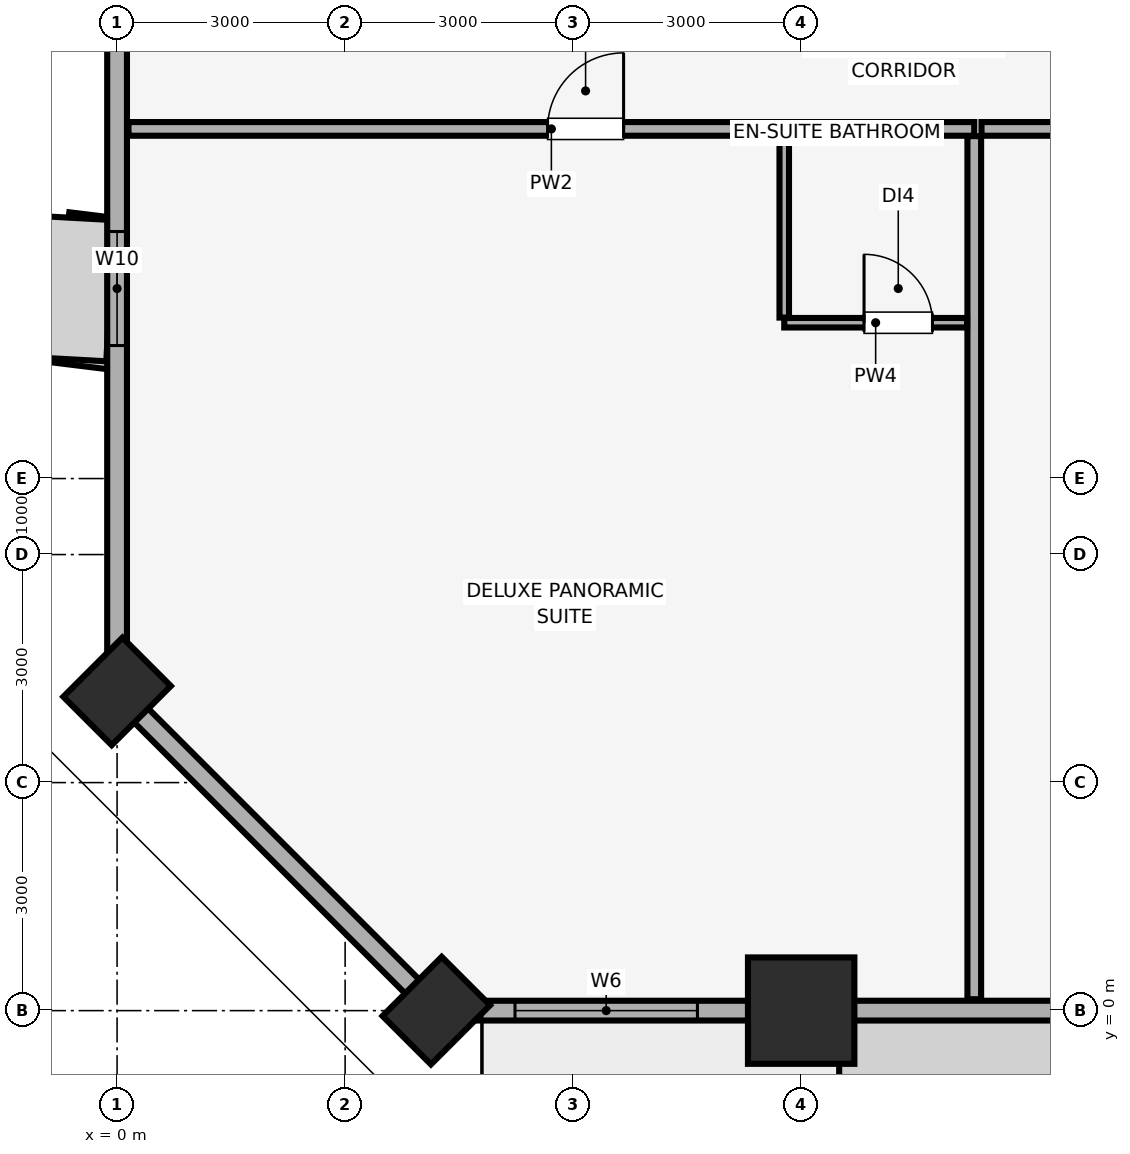
"""IFC4 building model, lengths in metres.
Left out: names, types, materials, properties, quantities, classifications, styles, units other than length and angle.
Written with IfcOpenShell. Run it as: python <this file> out.ifc"""

import sys

from ifc_helpers import new_model, si_unit, direction, frame, frame_2d, origin, origin_2d, place, context, subcontext, project, spatial, rectangle, extrude, element, fill, save


model = new_model("IFC4")
c1 = context("Model", 3, precision=1e-05, world=origin(), true_north=direction((0.0, 1.0)))
c2 = subcontext(c1, "Body", "Model", "MODEL_VIEW")
j1 = project(units=[si_unit("LENGTHUNIT", "METRE"), si_unit("PLANEANGLEUNIT", "RADIAN")], contexts=[c1])
p1 = place(None, origin())
s1 = spatial("IfcSite", under=j1, at=p1, CompositionType="ELEMENT")
p2 = place(p1, origin())
s2 = spatial("IfcBuilding", under=s1, at=p2, CompositionType="ELEMENT")
p3 = place(p2, frame((0.0, 0.0, 57.65)))
s3 = spatial("IfcBuildingStorey", under=s2, at=p3, CompositionType="ELEMENT", Elevation=57.65)
p4 = place(p3, frame((9.0, 0.0, 0.0), z_axis=(0.0, 0.0, 1.0), x_axis=(1.0, 0.0, 0.0)))
e1 = element("IfcColumn", 1, at=p4, inside=s3, PredefinedType="COLUMN", context=c2, shape_type="SweptSolid", body=[
    extrude(rectangle(XDim=1.4, YDim=1.4, at=origin_2d()), origin(), (0.0, 0.0, 1.0), 3.51),
])
for number, where, z_axis, x_axis in (
    (2, (4.2, 0.0, 0.0), (0.0, 0.0, 1.0), (0.707, 0.707, 0.0)),
    (3, (0.0, 4.2, 0.0), (0.0, 0.0, 1.0), (0.707, 0.707, 0.0)),
):
    element("IfcColumn", number, at=place(p3, frame(where, z_axis=z_axis, x_axis=x_axis)), inside=s3, PredefinedType="PILASTER", context=c2, shape_type="SweptSolid", body=[
        extrude(rectangle(XDim=1.1, YDim=0.9, at=origin_2d()), origin(), (0.0, 0.0, 1.0), 3.51),
    ])
p5 = place(p3, frame((4.2, 0.0, 0.0), z_axis=(0.0, 0.0, 1.0), x_axis=(1.0, 0.0, 0.0)))
e4 = element("IfcWall", 4, at=p5, inside=s3, PredefinedType="SOLIDWALL", context=c2, shape_type="SweptSolid", body=[
    extrude(rectangle(XDim=75.6, YDim=0.26, at=frame_2d((37.8, 0.0))), origin(), (0.0, 0.0, 1.0), 2.56),
])
p6 = place(p5, frame((21.383, 0.0, 0.0)))
e5 = element("IfcOpeningElement", 5, at=p6, cuts=e4, PredefinedType="OPENING", context=c2, shape_type="SweptSolid", body=[
    extrude(rectangle(XDim=1.1, YDim=2.15, at=frame_2d((0.55, 1.075))), frame((0.0, 0.14, 0.0), z_axis=(0.0, -1.0, 0.0), x_axis=(1.0, 0.0, 0.0)), (0.0, 0.0, 1.0), 0.28),
])
p7 = place(p5, frame((37.25, 0.0, 0.0)))
e6 = element("IfcOpeningElement", 6, at=p7, cuts=e4, PredefinedType="OPENING", context=c2, shape_type="SweptSolid", body=[
    extrude(rectangle(XDim=1.1, YDim=2.15, at=frame_2d((0.55, 1.075))), frame((0.0, 0.14, 0.0), z_axis=(0.0, -1.0, 0.0), x_axis=(1.0, 0.0, 0.0)), (0.0, 0.0, 1.0), 0.28),
])
p8 = place(p5, frame((53.117, 0.0, 0.0)))
e7 = element("IfcOpeningElement", 7, at=p8, cuts=e4, PredefinedType="OPENING", context=c2, shape_type="SweptSolid", body=[
    extrude(rectangle(XDim=1.1, YDim=2.15, at=frame_2d((0.55, 1.075))), frame((0.0, 0.14, 0.0), z_axis=(0.0, -1.0, 0.0), x_axis=(1.0, 0.0, 0.0)), (0.0, 0.0, 1.0), 0.28),
])
p9 = place(p5, frame((1.035, 0.0, 0.85)))
e8 = element("IfcOpeningElement", 8, at=p9, cuts=e4, PredefinedType="OPENING", context=c2, shape_type="SweptSolid", body=[
    extrude(rectangle(XDim=2.4, YDim=1.5, at=frame_2d((1.2, 0.75))), frame((0.0, 0.14, 0.0), z_axis=(0.0, -1.0, 0.0), x_axis=(1.0, 0.0, 0.0)), (0.0, 0.0, 1.0), 0.28),
])
p10 = place(p5, frame((8.138, 0.0, 0.85)))
e9 = element("IfcOpeningElement", 9, at=p10, cuts=e4, PredefinedType="OPENING", context=c2, shape_type="SweptSolid", body=[
    extrude(rectangle(XDim=2.4, YDim=1.5, at=frame_2d((1.2, 0.75))), frame((0.0, 0.14, 0.0), z_axis=(0.0, -1.0, 0.0), x_axis=(1.0, 0.0, 0.0)), (0.0, 0.0, 1.0), 0.28),
])
p11 = place(p5, frame((15.153, 0.0, 0.85)))
e10 = element("IfcOpeningElement", 10, at=p11, cuts=e4, PredefinedType="OPENING", context=c2, shape_type="SweptSolid", body=[
    extrude(rectangle(XDim=2.4, YDim=1.5, at=frame_2d((1.2, 0.75))), frame((0.0, 0.14, 0.0), z_axis=(0.0, -1.0, 0.0), x_axis=(1.0, 0.0, 0.0)), (0.0, 0.0, 1.0), 0.28),
])
p12 = place(p5, frame((23.127, 0.0, 0.85)))
e11 = element("IfcOpeningElement", 11, at=p12, cuts=e4, PredefinedType="OPENING", context=c2, shape_type="SweptSolid", body=[
    extrude(rectangle(XDim=2.4, YDim=1.5, at=frame_2d((1.2, 0.75))), frame((0.0, 0.14, 0.0), z_axis=(0.0, -1.0, 0.0), x_axis=(1.0, 0.0, 0.0)), (0.0, 0.0, 1.0), 0.28),
])
p13 = place(p5, frame((29.179, 0.0, 0.85)))
e12 = element("IfcOpeningElement", 12, at=p13, cuts=e4, PredefinedType="OPENING", context=c2, shape_type="SweptSolid", body=[
    extrude(rectangle(XDim=2.4, YDim=1.5, at=frame_2d((1.2, 0.75))), frame((0.0, 0.14, 0.0), z_axis=(0.0, -1.0, 0.0), x_axis=(1.0, 0.0, 0.0)), (0.0, 0.0, 1.0), 0.28),
])
p14 = place(p5, frame((34.983, 0.0, 0.85)))
e13 = element("IfcOpeningElement", 13, at=p14, cuts=e4, PredefinedType="OPENING", context=c2, shape_type="SweptSolid", body=[
    extrude(rectangle(XDim=1.5, YDim=1.4, at=frame_2d((0.75, 0.7))), frame((0.0, 0.14, 0.0), z_axis=(0.0, -1.0, 0.0), x_axis=(1.0, 0.0, 0.0)), (0.0, 0.0, 1.0), 0.28),
])
p15 = place(p5, frame((39.117, 0.0, 0.85)))
e14 = element("IfcOpeningElement", 14, at=p15, cuts=e4, PredefinedType="OPENING", context=c2, shape_type="SweptSolid", body=[
    extrude(rectangle(XDim=1.5, YDim=1.4, at=frame_2d((0.75, 0.7))), frame((0.0, 0.14, 0.0), z_axis=(0.0, -1.0, 0.0), x_axis=(1.0, 0.0, 0.0)), (0.0, 0.0, 1.0), 0.28),
])
p16 = place(p5, frame((44.021, 0.0, 0.85)))
e15 = element("IfcOpeningElement", 15, at=p16, cuts=e4, PredefinedType="OPENING", context=c2, shape_type="SweptSolid", body=[
    extrude(rectangle(XDim=2.4, YDim=1.5, at=frame_2d((1.2, 0.75))), frame((0.0, 0.14, 0.0), z_axis=(0.0, -1.0, 0.0), x_axis=(1.0, 0.0, 0.0)), (0.0, 0.0, 1.0), 0.28),
])
p17 = place(p5, frame((50.073, 0.0, 0.85)))
e16 = element("IfcOpeningElement", 16, at=p17, cuts=e4, PredefinedType="OPENING", context=c2, shape_type="SweptSolid", body=[
    extrude(rectangle(XDim=2.4, YDim=1.5, at=frame_2d((1.2, 0.75))), frame((0.0, 0.14, 0.0), z_axis=(0.0, -1.0, 0.0), x_axis=(1.0, 0.0, 0.0)), (0.0, 0.0, 1.0), 0.28),
])
p18 = place(p5, frame((58.048, 0.0, 0.85)))
e17 = element("IfcOpeningElement", 17, at=p18, cuts=e4, PredefinedType="OPENING", context=c2, shape_type="SweptSolid", body=[
    extrude(rectangle(XDim=2.4, YDim=1.5, at=frame_2d((1.2, 0.75))), frame((0.0, 0.14, 0.0), z_axis=(0.0, -1.0, 0.0), x_axis=(1.0, 0.0, 0.0)), (0.0, 0.0, 1.0), 0.28),
])
p19 = place(p5, frame((65.062, 0.0, 0.85)))
e18 = element("IfcOpeningElement", 18, at=p19, cuts=e4, PredefinedType="OPENING", context=c2, shape_type="SweptSolid", body=[
    extrude(rectangle(XDim=2.4, YDim=1.5, at=frame_2d((1.2, 0.75))), frame((0.0, 0.14, 0.0), z_axis=(0.0, -1.0, 0.0), x_axis=(1.0, 0.0, 0.0)), (0.0, 0.0, 1.0), 0.28),
])
p20 = place(p5, frame((72.165, 0.0, 0.85)))
e19 = element("IfcOpeningElement", 19, at=p20, cuts=e4, PredefinedType="OPENING", context=c2, shape_type="SweptSolid", body=[
    extrude(rectangle(XDim=2.4, YDim=1.5, at=frame_2d((1.2, 0.75))), frame((0.0, 0.14, 0.0), z_axis=(0.0, -1.0, 0.0), x_axis=(1.0, 0.0, 0.0)), (0.0, 0.0, 1.0), 0.28),
])
p21 = place(p3, frame((0.0, 44.8, 0.0), z_axis=(0.0, 0.0, 1.0), x_axis=(0.0, -1.0, 0.0)))
e20 = element("IfcWall", 20, at=p21, inside=s3, PredefinedType="SOLIDWALL", context=c2, shape_type="SweptSolid", body=[
    extrude(rectangle(XDim=40.6, YDim=0.26, at=frame_2d((20.3, 0.0))), origin(), (0.0, 0.0, 1.0), 2.56),
])
p22 = place(p21, frame((34.55, 0.0, 0.85)))
e21 = element("IfcOpeningElement", 21, at=p22, cuts=e20, PredefinedType="OPENING", context=c2, shape_type="SweptSolid", body=[
    extrude(rectangle(XDim=1.5, YDim=1.4, at=frame_2d((0.75, 0.7))), frame((0.0, 0.14, 0.0), z_axis=(0.0, -1.0, 0.0), x_axis=(1.0, 0.0, 0.0)), (0.0, 0.0, 1.0), 0.28),
])
p23 = place(p21, frame((25.64, 0.0, 0.85)))
e22 = element("IfcOpeningElement", 22, at=p23, cuts=e20, PredefinedType="OPENING", context=c2, shape_type="SweptSolid", body=[
    extrude(rectangle(XDim=1.5, YDim=1.4, at=frame_2d((0.75, 0.7))), frame((0.0, 0.14, 0.0), z_axis=(0.0, -1.0, 0.0), x_axis=(1.0, 0.0, 0.0)), (0.0, 0.0, 1.0), 0.28),
])
p24 = place(p21, frame((18.84, 0.0, 0.85)))
e23 = element("IfcOpeningElement", 23, at=p24, cuts=e20, PredefinedType="OPENING", context=c2, shape_type="SweptSolid", body=[
    extrude(rectangle(XDim=1.5, YDim=1.4, at=frame_2d((0.75, 0.7))), frame((0.0, 0.14, 0.0), z_axis=(0.0, -1.0, 0.0), x_axis=(1.0, 0.0, 0.0)), (0.0, 0.0, 1.0), 0.28),
])
p25 = place(p21, frame((11.935, 0.0, 0.85)))
e24 = element("IfcOpeningElement", 24, at=p25, cuts=e20, PredefinedType="OPENING", context=c2, shape_type="SweptSolid", body=[
    extrude(rectangle(XDim=1.5, YDim=1.4, at=frame_2d((0.75, 0.7))), frame((0.0, 0.14, 0.0), z_axis=(0.0, -1.0, 0.0), x_axis=(1.0, 0.0, 0.0)), (0.0, 0.0, 1.0), 0.28),
])
p26 = place(p21, frame((7.165, 0.0, 0.85)))
e25 = element("IfcOpeningElement", 25, at=p26, cuts=e20, PredefinedType="OPENING", context=c2, shape_type="SweptSolid", body=[
    extrude(rectangle(XDim=1.5, YDim=1.4, at=frame_2d((0.75, 0.7))), frame((0.0, 0.14, 0.0), z_axis=(0.0, -1.0, 0.0), x_axis=(1.0, 0.0, 0.0)), (0.0, 0.0, 1.0), 0.28),
])
p27 = place(p21, frame((1.735, 0.0, 0.85)))
e26 = element("IfcOpeningElement", 26, at=p27, cuts=e20, PredefinedType="OPENING", context=c2, shape_type="SweptSolid", body=[
    extrude(rectangle(XDim=1.5, YDim=1.4, at=frame_2d((0.75, 0.7))), frame((0.0, 0.14, 0.0), z_axis=(0.0, -1.0, 0.0), x_axis=(1.0, 0.0, 0.0)), (0.0, 0.0, 1.0), 0.28),
])
p28 = place(p3, frame((0.0, 4.2, 0.0), z_axis=(0.0, 0.0, 1.0), x_axis=(0.707106781187, -0.707106781187, 0.0)))
e27 = element("IfcWall", 27, at=p28, inside=s3, PredefinedType="SOLIDWALL", context=c2, shape_type="SweptSolid", body=[
    extrude(rectangle(XDim=5.94, YDim=0.26, at=frame_2d((2.97, 0.0))), origin(), (0.0, 0.0, 1.0), 2.56),
])
p29 = place(p3, frame((0.15, 11.6, 0.0), z_axis=(0.0, 0.0, 1.0), x_axis=(1.0, 0.0, 0.0)))
e28 = element("IfcWall", 28, at=p29, inside=s3, PredefinedType="PARTITIONING", context=c2, shape_type="SweptSolid", body=[
    extrude(rectangle(XDim=11.127, YDim=0.18, at=frame_2d((5.564, 0.0))), origin(), (0.0, 0.0, 1.0), 3.51),
])
p30 = place(p29, frame((5.514, 0.0, 0.0)))
e29 = element("IfcOpeningElement", 29, at=p30, cuts=e28, PredefinedType="OPENING", context=c2, shape_type="SweptSolid", body=[
    extrude(rectangle(XDim=1.0, YDim=2.15, at=frame_2d((0.5, 1.075))), frame((0.0, 0.1, 0.0), z_axis=(0.0, -1.0, 0.0), x_axis=(1.0, 0.0, 0.0)), (0.0, 0.0, 1.0), 0.2),
])
p31 = place(p3, frame((11.277, 0.15, 0.0), z_axis=(0.0, 0.0, 1.0), x_axis=(0.0, 1.0, 0.0)))
e30 = element("IfcWall", 30, at=p31, inside=s3, PredefinedType="PARTITIONING", context=c2, shape_type="SweptSolid", body=[
    extrude(rectangle(XDim=11.355, YDim=0.18, at=frame_2d((5.677, 0.0))), origin(), (0.0, 0.0, 1.0), 3.51),
])
p32 = place(p3, frame((8.777, 9.05, 0.0), z_axis=(0.0, 0.0, 1.0), x_axis=(1.0, 0.0, 0.0)))
e31 = element("IfcWall", 31, at=p32, inside=s3, PredefinedType="PARTITIONING", context=c2, shape_type="SweptSolid", body=[
    extrude(rectangle(XDim=2.405, YDim=0.125, at=frame_2d((1.203, 0.0))), origin(), (0.0, 0.0, 1.0), 3.51),
])
p33 = place(p32, frame((1.05, 0.0, 0.0)))
e32 = element("IfcOpeningElement", 32, at=p33, cuts=e31, PredefinedType="OPENING", context=c2, shape_type="SweptSolid", body=[
    extrude(rectangle(XDim=0.9, YDim=2.1, at=frame_2d((0.45, 1.05))), frame((0.0, 0.073, 0.0), z_axis=(0.0, -1.0, 0.0), x_axis=(1.0, 0.0, 0.0)), (0.0, 0.0, 1.0), 0.145),
])
p34 = place(p3, frame((8.777, 9.117, 0.0), z_axis=(0.0, 0.0, 1.0), x_axis=(0.0, 1.0, 0.0)))
e33 = element("IfcWall", 33, at=p34, inside=s3, PredefinedType="PARTITIONING", context=c2, shape_type="SweptSolid", body=[
    extrude(rectangle(XDim=2.387, YDim=0.125, at=frame_2d((1.194, 0.0))), origin(), (0.0, 0.0, 1.0), 2.898),
])
p35 = place(p3, frame((11.372, 11.6, 0.0), z_axis=(0.0, 0.0, 1.0), x_axis=(1.0, 0.0, 0.0)))
e34 = element("IfcWall", 34, at=p35, inside=s3, PredefinedType="PARTITIONING", context=c2, shape_type="SweptSolid", body=[
    extrude(rectangle(XDim=6.732, YDim=0.18, at=frame_2d((3.366, 0.0))), origin(), (0.0, 0.0, 1.0), 3.51),
])
p36 = place(p35, frame((1.279, 0.0, 0.0)))
e35 = element("IfcOpeningElement", 35, at=p36, cuts=e34, PredefinedType="OPENING", context=c2, shape_type="SweptSolid", body=[
    extrude(rectangle(XDim=1.0, YDim=2.15, at=frame_2d((0.5, 1.075))), frame((0.0, 0.1, 0.0), z_axis=(0.0, -1.0, 0.0), x_axis=(1.0, 0.0, 0.0)), (0.0, 0.0, 1.0), 0.2),
])
p37 = place(p9, origin())
e36 = element("IfcWindow", 36, at=p37, inside=s3, PartitioningType="SINGLE_PANEL", PredefinedType="WINDOW", context=c2, shape_type="SweptSolid", body=[
    extrude(rectangle(XDim=2.4, YDim=1.5, at=frame_2d((1.2, 0.75))), frame((0.0, 0.03, 0.0), z_axis=(0.0, -1.0, 0.0), x_axis=(1.0, 0.0, 0.0)), (0.0, 0.0, 1.0), 0.06),
])
fill(e8, e36)
p38 = place(p22, origin())
e37 = element("IfcWindow", 37, at=p38, inside=s3, PartitioningType="SINGLE_PANEL", PredefinedType="WINDOW", context=c2, shape_type="SweptSolid", body=[
    extrude(rectangle(XDim=1.5, YDim=1.4, at=frame_2d((0.75, 0.7))), frame((0.0, 0.03, 0.0), z_axis=(0.0, -1.0, 0.0), x_axis=(1.0, 0.0, 0.0)), (0.0, 0.0, 1.0), 0.06),
])
fill(e21, e37)
p39 = place(p30, origin())
e38 = element("IfcDoor", 38, at=p39, inside=s3, OperationType="SINGLE_SWING_RIGHT", PredefinedType="DOOR", context=c2, shape_type="SweptSolid", body=[
    extrude(rectangle(XDim=1.0, YDim=2.15, at=frame_2d((0.5, 1.075))), frame((0.0, 0.025, 0.0), z_axis=(0.0, -1.0, 0.0), x_axis=(1.0, 0.0, 0.0)), (0.0, 0.0, 1.0), 0.05),
])
fill(e29, e38)
p40 = place(p33, origin())
e39 = element("IfcDoor", 39, at=p40, inside=s3, OperationType="SINGLE_SWING_LEFT", PredefinedType="DOOR", context=c2, shape_type="SweptSolid", body=[
    extrude(rectangle(XDim=0.9, YDim=2.1, at=frame_2d((0.45, 1.05))), frame((0.0, 0.025, 0.0), z_axis=(0.0, -1.0, 0.0), x_axis=(1.0, 0.0, 0.0)), (0.0, 0.0, 1.0), 0.05),
])
fill(e32, e39)
save(model, sys.argv[1])
